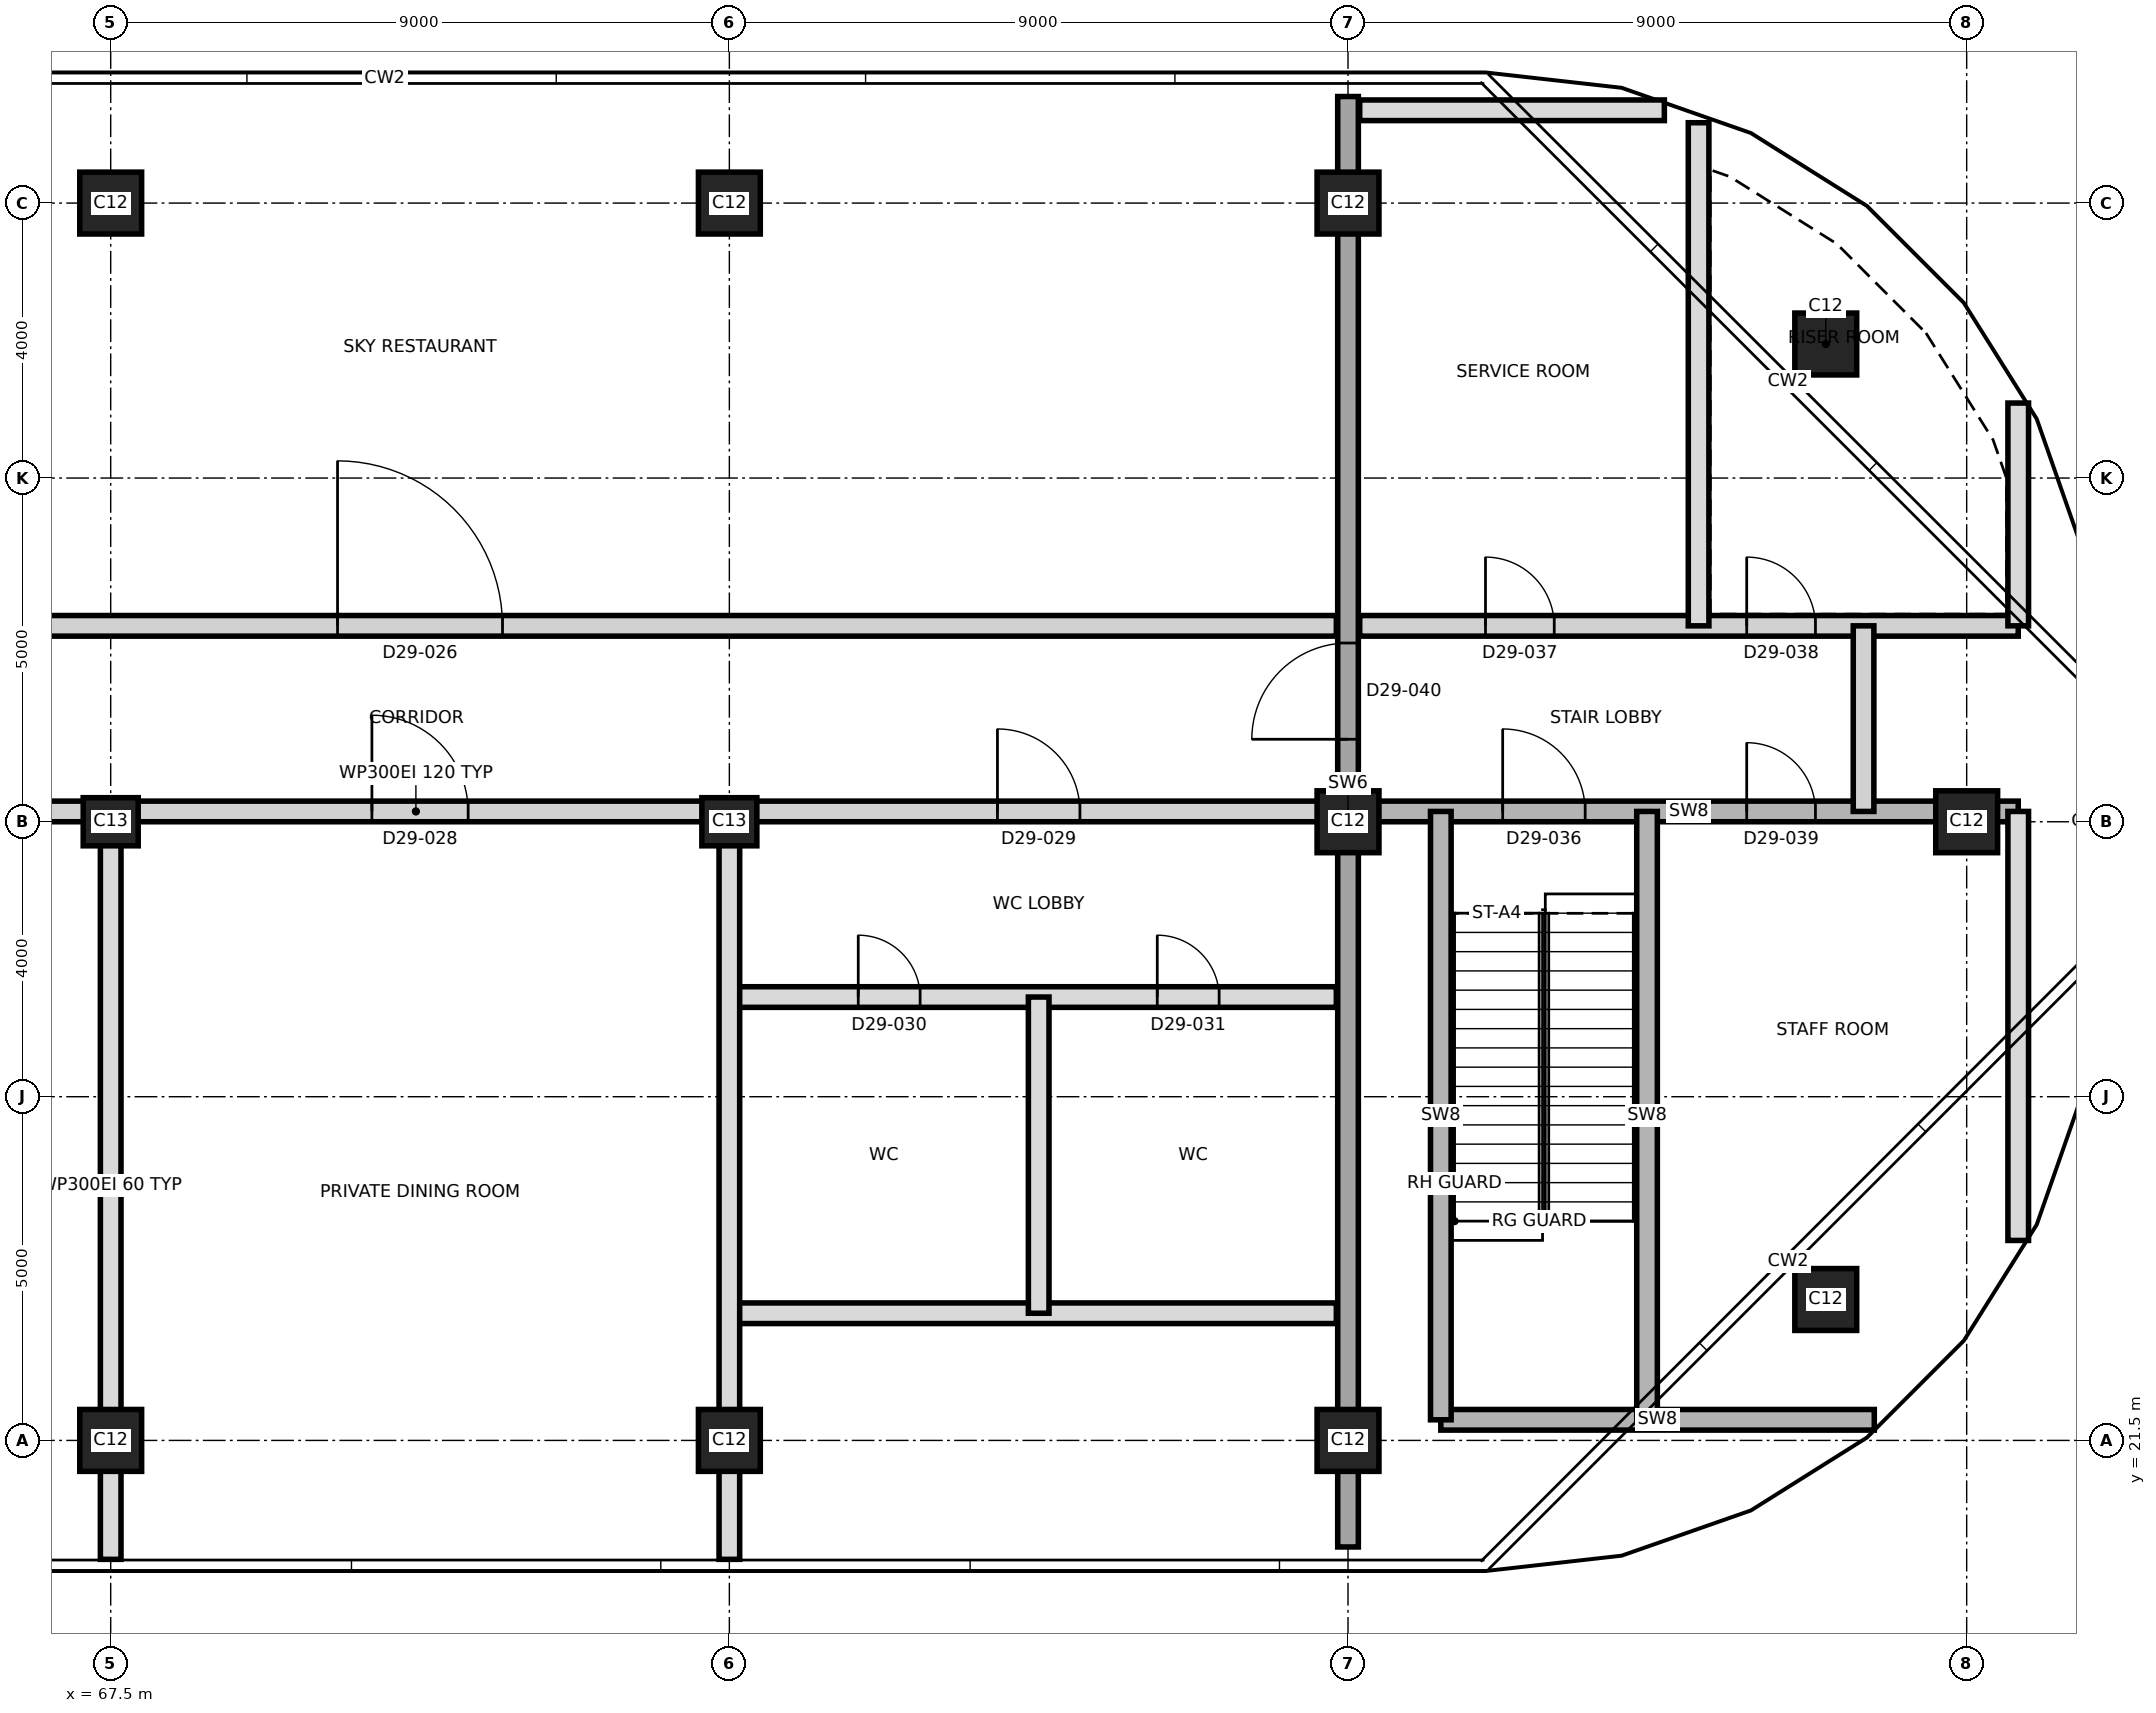
"""IFC4 building model, lengths in metres.
Left out: names, types, materials, properties, quantities, classifications, styles, units other than length and angle.
Written with IfcOpenShell. Run it as: python <this file> out.ifc"""

import sys

from ifc_helpers import new_model, si_unit, direction, frame, frame_2d, origin, origin_2d, place, context, subcontext, project, spatial, rectangle, extrude, element, fill, save


model = new_model("IFC4")
c1 = context("Model", 3, precision=1e-05, world=origin(), true_north=direction((0.0, 1.0)))
c2 = subcontext(c1, "Body", "Model", "MODEL_VIEW")
j1 = project(units=[si_unit("LENGTHUNIT", "METRE"), si_unit("PLANEANGLEUNIT", "RADIAN")], contexts=[c1])
p1 = place(None, origin())
s1 = spatial("IfcSite", under=j1, at=p1, CompositionType="ELEMENT")
p2 = place(p1, origin())
s2 = spatial("IfcBuilding", under=s1, at=p2, CompositionType="ELEMENT")
p3 = place(p2, frame((0.0, 0.0, 254.9)))
s3 = spatial("IfcBuildingStorey", under=s2, at=p3, CompositionType="ELEMENT", Elevation=254.9)
for number, where, z_axis, x_axis in (
    (1, (67.5, 21.5, 0.0), (0.0, 0.0, 1.0), (1.0, 0.0, 0.0)),
    (2, (76.5, 21.5, 0.0), (0.0, 0.0, 1.0), (1.0, 0.0, 0.0)),
    (3, (85.5, 21.5, 0.0), (0.0, 0.0, 1.0), (1.0, 0.0, 0.0)),
    (4, (92.45, 23.55, 0.0), (0.0, 0.0, 1.0), (1.0, 0.0, 0.0)),
):
    element("IfcColumn", number, at=place(p3, frame(where, z_axis=z_axis, x_axis=x_axis)), inside=s3, PredefinedType="COLUMN", context=c2, shape_type="SweptSolid", body=[
        extrude(rectangle(XDim=0.9, YDim=0.9, at=origin_2d()), origin(), (0.0, 0.0, 1.0), 6.0),
    ])
for number, where, z_axis, x_axis in (
    (5, (67.5, 30.5, 0.0), (0.0, 0.0, 1.0), (1.0, 0.0, 0.0)),
    (6, (76.5, 30.5, 0.0), (0.0, 0.0, 1.0), (1.0, 0.0, 0.0)),
):
    element("IfcColumn", number, at=place(p3, frame(where, z_axis=z_axis, x_axis=x_axis)), inside=s3, PredefinedType="COLUMN", context=c2, shape_type="SweptSolid", body=[
        extrude(rectangle(XDim=0.8, YDim=0.7, at=origin_2d()), origin(), (0.0, 0.0, 1.0), 6.0),
    ])
for number, where, z_axis, x_axis in (
    (7, (85.5, 30.5, 0.0), (0.0, 0.0, 1.0), (1.0, 0.0, 0.0)),
    (8, (94.5, 30.5, 0.0), (0.0, 0.0, 1.0), (1.0, 0.0, 0.0)),
    (9, (92.45, 37.45, 0.0), (0.0, 0.0, 1.0), (1.0, 0.0, 0.0)),
    (10, (67.5, 39.5, 0.0), (0.0, 0.0, 1.0), (1.0, 0.0, 0.0)),
    (11, (76.5, 39.5, 0.0), (0.0, 0.0, 1.0), (1.0, 0.0, 0.0)),
    (12, (85.5, 39.5, 0.0), (0.0, 0.0, 1.0), (1.0, 0.0, 0.0)),
):
    element("IfcColumn", number, at=place(p3, frame(where, z_axis=z_axis, x_axis=x_axis)), inside=s3, PredefinedType="COLUMN", context=c2, shape_type="SweptSolid", body=[
        extrude(rectangle(XDim=0.9, YDim=0.9, at=origin_2d()), origin(), (0.0, 0.0, 1.0), 6.0),
    ])
p4 = place(p3, frame((85.5, 19.95, 0.0), z_axis=(0.0, 0.0, 1.0), x_axis=(0.0, 1.0, 0.0)))
e13 = element("IfcWall", 13, at=p4, inside=s3, PredefinedType="SHEAR", context=c2, shape_type="SweptSolid", body=[
    extrude(rectangle(XDim=21.1, YDim=0.3, at=frame_2d((10.55, 0.0))), origin(), (0.0, 0.0, 1.0), 6.0),
])
p5 = place(p4, frame((11.75, 0.0, 0.0)))
e14 = element("IfcOpeningElement", 14, at=p5, cuts=e13, PredefinedType="OPENING", context=c2, shape_type="SweptSolid", body=[
    extrude(rectangle(XDim=1.4, YDim=2.1, at=frame_2d((0.7, 1.05))), frame((0.0, 0.16, 0.0), z_axis=(0.0, -1.0, 0.0), x_axis=(1.0, 0.0, 0.0)), (0.0, 0.0, 1.0), 0.32),
])
p6 = place(p3, frame((86.85, 21.8, 0.0), z_axis=(0.0, 0.0, 1.0), x_axis=(1.0, 0.0, 0.0)))
e15 = element("IfcWall", 15, at=p6, inside=s3, PredefinedType="SHEAR", context=c2, shape_type="SweptSolid", body=[
    extrude(rectangle(XDim=6.306, YDim=0.3, at=frame_2d((3.153, 0.0))), origin(), (0.0, 0.0, 1.0), 5.7),
])
p7 = place(p3, frame((76.5, 23.35, 0.0), z_axis=(0.0, 0.0, 1.0), x_axis=(1.0, 0.0, 0.0)))
e16 = element("IfcWall", 16, at=p7, inside=s3, PredefinedType="PARTITIONING", context=c2, shape_type="SweptSolid", body=[
    extrude(rectangle(XDim=8.83, YDim=0.3, at=frame_2d((4.415, 0.0))), origin(), (0.0, 0.0, 1.0), 5.7),
])
p8 = place(p3, frame((76.5, 27.95, 0.0), z_axis=(0.0, 0.0, 1.0), x_axis=(1.0, 0.0, 0.0)))
e17 = element("IfcWall", 17, at=p8, inside=s3, PredefinedType="PARTITIONING", context=c2, shape_type="SweptSolid", body=[
    extrude(rectangle(XDim=8.83, YDim=0.3, at=frame_2d((4.415, 0.0))), origin(), (0.0, 0.0, 1.0), 5.7),
])
p9 = place(p8, frame((1.875, 0.0, 0.0)))
e18 = element("IfcOpeningElement", 18, at=p9, cuts=e17, PredefinedType="OPENING", context=c2, shape_type="SweptSolid", body=[
    extrude(rectangle(XDim=0.9, YDim=2.1, at=frame_2d((0.45, 1.05))), frame((0.0, 0.16, 0.0), z_axis=(0.0, -1.0, 0.0), x_axis=(1.0, 0.0, 0.0)), (0.0, 0.0, 1.0), 0.32),
])
p10 = place(p8, frame((6.225, 0.0, 0.0)))
e19 = element("IfcOpeningElement", 19, at=p10, cuts=e17, PredefinedType="OPENING", context=c2, shape_type="SweptSolid", body=[
    extrude(rectangle(XDim=0.9, YDim=2.1, at=frame_2d((0.45, 1.05))), frame((0.0, 0.16, 0.0), z_axis=(0.0, -1.0, 0.0), x_axis=(1.0, 0.0, 0.0)), (0.0, 0.0, 1.0), 0.32),
])
p11 = place(p3, frame((58.55, 30.65, 0.0), z_axis=(0.0, 0.0, 1.0), x_axis=(1.0, 0.0, 0.0)))
e20 = element("IfcWall", 20, at=p11, inside=s3, PredefinedType="PARTITIONING", context=c2, shape_type="SweptSolid", body=[
    extrude(rectangle(XDim=26.78, YDim=0.3, at=frame_2d((13.39, 0.0))), origin(), (0.0, 0.0, 1.0), 5.7),
])
p12 = place(p11, frame((3.75, 0.0, 0.0)))
e21 = element("IfcOpeningElement", 21, at=p12, cuts=e20, PredefinedType="OPENING", context=c2, shape_type="SweptSolid", body=[
    extrude(rectangle(XDim=1.4, YDim=2.1, at=frame_2d((0.7, 1.05))), frame((0.0, 0.16, 0.0), z_axis=(0.0, -1.0, 0.0), x_axis=(1.0, 0.0, 0.0)), (0.0, 0.0, 1.0), 0.32),
])
p13 = place(p11, frame((12.75, 0.0, 0.0)))
e22 = element("IfcOpeningElement", 22, at=p13, cuts=e20, PredefinedType="OPENING", context=c2, shape_type="SweptSolid", body=[
    extrude(rectangle(XDim=1.4, YDim=2.1, at=frame_2d((0.7, 1.05))), frame((0.0, 0.16, 0.0), z_axis=(0.0, -1.0, 0.0), x_axis=(1.0, 0.0, 0.0)), (0.0, 0.0, 1.0), 0.32),
])
p14 = place(p11, frame((21.85, 0.0, 0.0)))
e23 = element("IfcOpeningElement", 23, at=p14, cuts=e20, PredefinedType="OPENING", context=c2, shape_type="SweptSolid", body=[
    extrude(rectangle(XDim=1.2, YDim=2.1, at=frame_2d((0.6, 1.05))), frame((0.0, 0.16, 0.0), z_axis=(0.0, -1.0, 0.0), x_axis=(1.0, 0.0, 0.0)), (0.0, 0.0, 1.0), 0.32),
])
p15 = place(p3, frame((85.67, 30.65, 0.0), z_axis=(0.0, 0.0, 1.0), x_axis=(1.0, 0.0, 0.0)))
e24 = element("IfcWall", 24, at=p15, inside=s3, PredefinedType="SHEAR", context=c2, shape_type="SweptSolid", body=[
    extrude(rectangle(XDim=9.58, YDim=0.3, at=frame_2d((4.79, 0.0))), origin(), (0.0, 0.0, 1.0), 5.7),
])
p16 = place(p15, frame((2.08, 0.0, 0.0)))
e25 = element("IfcOpeningElement", 25, at=p16, cuts=e24, PredefinedType="OPENING", context=c2, shape_type="SweptSolid", body=[
    extrude(rectangle(XDim=1.2, YDim=2.1, at=frame_2d((0.6, 1.05))), frame((0.0, 0.16, 0.0), z_axis=(0.0, -1.0, 0.0), x_axis=(1.0, 0.0, 0.0)), (0.0, 0.0, 1.0), 0.32),
])
p17 = place(p15, frame((5.63, 0.0, 0.0)))
e26 = element("IfcOpeningElement", 26, at=p17, cuts=e24, PredefinedType="OPENING", context=c2, shape_type="SweptSolid", body=[
    extrude(rectangle(XDim=1.0, YDim=2.1, at=frame_2d((0.5, 1.05))), frame((0.0, 0.16, 0.0), z_axis=(0.0, -1.0, 0.0), x_axis=(1.0, 0.0, 0.0)), (0.0, 0.0, 1.0), 0.32),
])
p18 = place(p3, frame((58.55, 33.35, 0.0), z_axis=(0.0, 0.0, 1.0), x_axis=(1.0, 0.0, 0.0)))
e27 = element("IfcWall", 27, at=p18, inside=s3, PredefinedType="PARTITIONING", context=c2, shape_type="SweptSolid", body=[
    extrude(rectangle(XDim=26.78, YDim=0.3, at=frame_2d((13.39, 0.0))), origin(), (0.0, 0.0, 1.0), 5.7),
])
p19 = place(p18, frame((12.25, 0.0, 0.0)))
e28 = element("IfcOpeningElement", 28, at=p19, cuts=e27, PredefinedType="OPENING", context=c2, shape_type="SweptSolid", body=[
    extrude(rectangle(XDim=2.4, YDim=2.4, at=frame_2d((1.2, 1.2))), frame((0.0, 0.16, 0.0), z_axis=(0.0, -1.0, 0.0), x_axis=(1.0, 0.0, 0.0)), (0.0, 0.0, 1.0), 0.32),
])
p20 = place(p3, frame((85.67, 33.35, 0.0), z_axis=(0.0, 0.0, 1.0), x_axis=(1.0, 0.0, 0.0)))
e29 = element("IfcWall", 29, at=p20, inside=s3, PredefinedType="PARTITIONING", context=c2, shape_type="SweptSolid", body=[
    extrude(rectangle(XDim=9.58, YDim=0.3, at=frame_2d((4.79, 0.0))), origin(), (0.0, 0.0, 1.0), 5.7),
])
p21 = place(p20, frame((1.83, 0.0, 0.0)))
e30 = element("IfcOpeningElement", 30, at=p21, cuts=e29, PredefinedType="OPENING", context=c2, shape_type="SweptSolid", body=[
    extrude(rectangle(XDim=1.0, YDim=2.1, at=frame_2d((0.5, 1.05))), frame((0.0, 0.16, 0.0), z_axis=(0.0, -1.0, 0.0), x_axis=(1.0, 0.0, 0.0)), (0.0, 0.0, 1.0), 0.32),
])
p22 = place(p20, frame((5.63, 0.0, 0.0)))
e31 = element("IfcOpeningElement", 31, at=p22, cuts=e29, PredefinedType="OPENING", context=c2, shape_type="SweptSolid", body=[
    extrude(rectangle(XDim=1.0, YDim=2.1, at=frame_2d((0.5, 1.05))), frame((0.0, 0.16, 0.0), z_axis=(0.0, -1.0, 0.0), x_axis=(1.0, 0.0, 0.0)), (0.0, 0.0, 1.0), 0.32),
])
p23 = place(p3, frame((85.67, 40.85, 0.0), z_axis=(0.0, 0.0, 1.0), x_axis=(1.0, 0.0, 0.0)))
e32 = element("IfcWall", 32, at=p23, inside=s3, PredefinedType="PARTITIONING", context=c2, shape_type="SweptSolid", body=[
    extrude(rectangle(XDim=4.432, YDim=0.3, at=frame_2d((2.216, 0.0))), origin(), (0.0, 0.0, 1.0), 5.65),
])
for number, where, z_axis, x_axis in (
    (33, (67.5, 19.77, 0.0), (0.0, 0.0, 1.0), (0.0, 1.0, 0.0)),
    (34, (76.5, 19.77, 0.0), (0.0, 0.0, 1.0), (0.0, 1.0, 0.0)),
):
    element("IfcWall", number, at=place(p3, frame(where, z_axis=z_axis, x_axis=x_axis)), inside=s3, PredefinedType="PARTITIONING", context=c2, shape_type="SweptSolid", body=[
        extrude(rectangle(XDim=10.88, YDim=0.3, at=frame_2d((5.44, 0.0))), origin(), (0.0, 0.0, 1.0), 5.65),
    ])
p24 = place(p3, frame((81.0, 23.35, 0.0), z_axis=(0.0, 0.0, 1.0), x_axis=(0.0, 1.0, 0.0)))
e35 = element("IfcWall", 35, at=p24, inside=s3, PredefinedType="PARTITIONING", context=c2, shape_type="SweptSolid", body=[
    extrude(rectangle(XDim=4.6, YDim=0.3, at=frame_2d((2.3, 0.0))), origin(), (0.0, 0.0, 1.0), 5.7),
])
for number, where, z_axis, x_axis in (
    (36, (86.85, 21.8, 0.0), (0.0, 0.0, 1.0), (0.0, 1.0, 0.0)),
    (37, (89.85, 21.8, 0.0), (0.0, 0.0, 1.0), (0.0, 1.0, 0.0)),
):
    element("IfcWall", number, at=place(p3, frame(where, z_axis=z_axis, x_axis=x_axis)), inside=s3, PredefinedType="SHEAR", context=c2, shape_type="SweptSolid", body=[
        extrude(rectangle(XDim=8.85, YDim=0.3, at=frame_2d((4.425, 0.0))), origin(), (0.0, 0.0, 1.0), 5.7),
    ])
p25 = place(p3, frame((90.6, 33.35, 0.0), z_axis=(0.0, 0.0, 1.0), x_axis=(0.0, 1.0, 0.0)))
e38 = element("IfcWall", 38, at=p25, inside=s3, PredefinedType="PARTITIONING", context=c2, shape_type="SweptSolid", body=[
    extrude(rectangle(XDim=7.319, YDim=0.3, at=frame_2d((3.659, 0.0))), origin(), (0.0, 0.0, 1.0), 5.65),
])
p26 = place(p3, frame((93.0, 30.65, 0.0), z_axis=(0.0, 0.0, 1.0), x_axis=(0.0, 1.0, 0.0)))
e39 = element("IfcWall", 39, at=p26, inside=s3, PredefinedType="PARTITIONING", context=c2, shape_type="SweptSolid", body=[
    extrude(rectangle(XDim=2.7, YDim=0.3, at=frame_2d((1.35, 0.0))), origin(), (0.0, 0.0, 1.0), 5.7),
])
p27 = place(p3, frame((95.25, 24.409, 0.0), z_axis=(0.0, 0.0, 1.0), x_axis=(0.0, 1.0, 0.0)))
e40 = element("IfcWall", 40, at=p27, inside=s3, PredefinedType="PARTITIONING", context=c2, shape_type="SweptSolid", body=[
    extrude(rectangle(XDim=6.241, YDim=0.3, at=frame_2d((3.121, 0.0))), origin(), (0.0, 0.0, 1.0), 5.65),
])
p28 = place(p3, frame((95.25, 33.35, 0.0), z_axis=(0.0, 0.0, 1.0), x_axis=(0.0, 1.0, 0.0)))
e41 = element("IfcWall", 41, at=p28, inside=s3, PredefinedType="PARTITIONING", context=c2, shape_type="SweptSolid", body=[
    extrude(rectangle(XDim=3.241, YDim=0.3, at=frame_2d((1.621, 0.0))), origin(), (0.0, 0.0, 1.0), 5.65),
])
p29 = place(p19, origin())
e42 = element("IfcDoor", 42, at=p29, inside=s3, OperationType="SINGLE_SWING_LEFT", PredefinedType="DOOR", context=c2, shape_type="SweptSolid", body=[
    extrude(rectangle(XDim=2.4, YDim=2.4, at=frame_2d((1.2, 1.2))), frame((0.0, 0.025, 0.0), z_axis=(0.0, -1.0, 0.0), x_axis=(1.0, 0.0, 0.0)), (0.0, 0.0, 1.0), 0.05),
])
fill(e28, e42)
p30 = place(p13, origin())
e43 = element("IfcDoor", 43, at=p30, inside=s3, OperationType="SINGLE_SWING_LEFT", PredefinedType="DOOR", context=c2, shape_type="SweptSolid", body=[
    extrude(rectangle(XDim=1.4, YDim=2.1, at=frame_2d((0.7, 1.05))), frame((0.0, 0.025, 0.0), z_axis=(0.0, -1.0, 0.0), x_axis=(1.0, 0.0, 0.0)), (0.0, 0.0, 1.0), 0.05),
])
fill(e22, e43)
p31 = place(p14, origin())
e44 = element("IfcDoor", 44, at=p31, inside=s3, OperationType="SINGLE_SWING_LEFT", PredefinedType="DOOR", context=c2, shape_type="SweptSolid", body=[
    extrude(rectangle(XDim=1.2, YDim=2.1, at=frame_2d((0.6, 1.05))), frame((0.0, 0.025, 0.0), z_axis=(0.0, -1.0, 0.0), x_axis=(1.0, 0.0, 0.0)), (0.0, 0.0, 1.0), 0.05),
])
fill(e23, e44)
p32 = place(p9, origin())
e45 = element("IfcDoor", 45, at=p32, inside=s3, OperationType="SINGLE_SWING_LEFT", PredefinedType="DOOR", context=c2, shape_type="SweptSolid", body=[
    extrude(rectangle(XDim=0.9, YDim=2.1, at=frame_2d((0.45, 1.05))), frame((0.0, 0.025, 0.0), z_axis=(0.0, -1.0, 0.0), x_axis=(1.0, 0.0, 0.0)), (0.0, 0.0, 1.0), 0.05),
])
fill(e18, e45)
p33 = place(p10, origin())
e46 = element("IfcDoor", 46, at=p33, inside=s3, OperationType="SINGLE_SWING_RIGHT", PredefinedType="DOOR", context=c2, shape_type="SweptSolid", body=[
    extrude(rectangle(XDim=0.9, YDim=2.1, at=frame_2d((0.45, 1.05))), frame((0.0, 0.025, 0.0), z_axis=(0.0, -1.0, 0.0), x_axis=(1.0, 0.0, 0.0)), (0.0, 0.0, 1.0), 0.05),
])
fill(e19, e46)
p34 = place(p16, origin())
e47 = element("IfcDoor", 47, at=p34, inside=s3, OperationType="SINGLE_SWING_LEFT", PredefinedType="DOOR", context=c2, shape_type="SweptSolid", body=[
    extrude(rectangle(XDim=1.2, YDim=2.1, at=frame_2d((0.6, 1.05))), frame((0.0, 0.025, 0.0), z_axis=(0.0, -1.0, 0.0), x_axis=(1.0, 0.0, 0.0)), (0.0, 0.0, 1.0), 0.05),
])
fill(e25, e47)
p35 = place(p21, origin())
e48 = element("IfcDoor", 48, at=p35, inside=s3, OperationType="SINGLE_SWING_LEFT", PredefinedType="DOOR", context=c2, shape_type="SweptSolid", body=[
    extrude(rectangle(XDim=1.0, YDim=2.1, at=frame_2d((0.5, 1.05))), frame((0.0, 0.025, 0.0), z_axis=(0.0, -1.0, 0.0), x_axis=(1.0, 0.0, 0.0)), (0.0, 0.0, 1.0), 0.05),
])
fill(e30, e48)
p36 = place(p22, origin())
e49 = element("IfcDoor", 49, at=p36, inside=s3, OperationType="SINGLE_SWING_RIGHT", PredefinedType="DOOR", context=c2, shape_type="SweptSolid", body=[
    extrude(rectangle(XDim=1.0, YDim=2.1, at=frame_2d((0.5, 1.05))), frame((0.0, 0.025, 0.0), z_axis=(0.0, -1.0, 0.0), x_axis=(1.0, 0.0, 0.0)), (0.0, 0.0, 1.0), 0.05),
])
fill(e31, e49)
p37 = place(p17, origin())
e50 = element("IfcDoor", 50, at=p37, inside=s3, OperationType="SINGLE_SWING_LEFT", PredefinedType="DOOR", context=c2, shape_type="SweptSolid", body=[
    extrude(rectangle(XDim=1.0, YDim=2.1, at=frame_2d((0.5, 1.05))), frame((0.0, 0.025, 0.0), z_axis=(0.0, -1.0, 0.0), x_axis=(1.0, 0.0, 0.0)), (0.0, 0.0, 1.0), 0.05),
])
fill(e26, e50)
p38 = place(p5, origin())
e51 = element("IfcDoor", 51, at=p38, inside=s3, OperationType="SINGLE_SWING_RIGHT", PredefinedType="DOOR", context=c2, shape_type="SweptSolid", body=[
    extrude(rectangle(XDim=1.4, YDim=2.1, at=frame_2d((0.7, 1.05))), frame((0.0, 0.025, 0.0), z_axis=(0.0, -1.0, 0.0), x_axis=(1.0, 0.0, 0.0)), (0.0, 0.0, 1.0), 0.05),
])
fill(e14, e51)
save(model, sys.argv[1])
